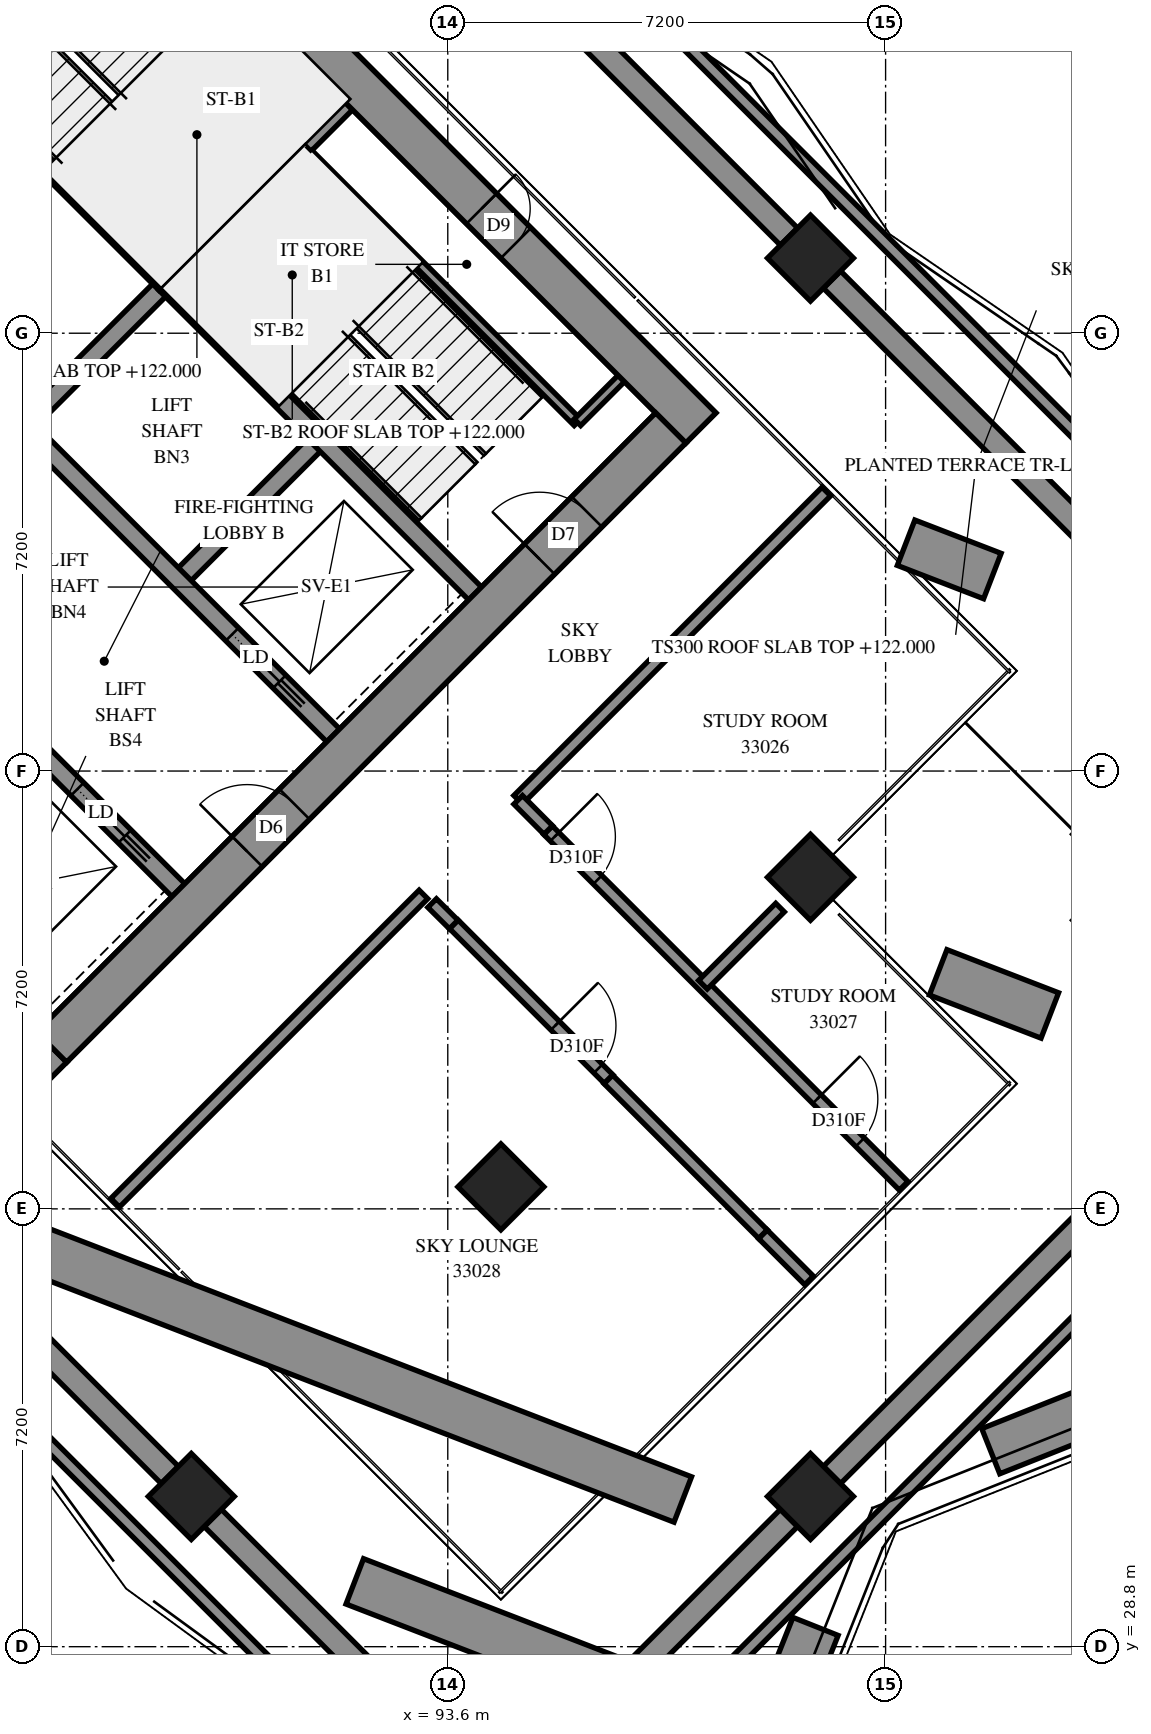
"""IFC4 building model, lengths in metres.
Left out: names, types, materials, properties, quantities, classifications, styles, units other than length and angle.
Written with IfcOpenShell. Run it as: python <this file> out.ifc"""

import sys

from ifc_helpers import new_model, si_unit, direction, frame, frame_2d, origin, origin_2d, place, context, subcontext, project, spatial, polyline, rectangle, outline, extrude, element, fill, save


model = new_model("IFC4")
c1 = context("Model", 3, precision=1e-05, world=origin(), true_north=direction((0.0, 1.0)))
c2 = subcontext(c1, "Body", "Model", "MODEL_VIEW")
j1 = project(units=[si_unit("LENGTHUNIT", "METRE"), si_unit("PLANEANGLEUNIT", "RADIAN")], contexts=[c1])
p1 = place(None, origin())
s1 = spatial("IfcSite", under=j1, at=p1, CompositionType="ELEMENT")
p2 = place(p1, origin())
s2 = spatial("IfcBuilding", under=s1, at=p2, CompositionType="ELEMENT")
p3 = place(p2, frame((0.0, 0.0, 122.0)))
s3 = spatial("IfcBuildingStorey", under=s2, at=p3, CompositionType="ELEMENT", Elevation=122.0)
for number, where, z_axis, x_axis in (
    (1, (99.565, 51.635, 0.0), (0.0, 0.0, 1.0), (0.707, -0.707, 0.0)),
    (2, (99.565, 41.453, 0.0), (0.0, 0.0, 1.0), (0.707, -0.707, 0.0)),
    (3, (94.474, 36.362, 0.0), (0.0, 0.0, 1.0), (0.707, -0.707, 0.0)),
    (4, (89.382, 31.271, 0.0), (0.0, 0.0, 1.0), (0.707, -0.707, 0.0)),
    (5, (99.565, 31.271, 0.0), (0.0, 0.0, 1.0), (0.707, -0.707, 0.0)),
):
    element("IfcColumn", number, at=place(p3, frame(where, z_axis=z_axis, x_axis=x_axis)), inside=s3, PredefinedType="COLUMN", context=c2, shape_type="SweptSolid", body=[
        extrude(rectangle(XDim=1.0, YDim=1.0, at=origin_2d()), origin(), (0.0, 0.0, 1.0), 3.9),
    ])
p4 = place(p3, frame((75.912, 49.337, -0.3), z_axis=(0.0, 0.0, 1.0), x_axis=(0.7071036166, -0.7071099457, 0.0)))
e6 = element("IfcWall", 6, at=p4, inside=s3, PredefinedType="SHEAR", context=c2, shape_type="SweptSolid", body=[
    extrude(rectangle(XDim=15.8, YDim=0.7, at=frame_2d((7.9, 0.0))), origin(), (0.0, 0.0, 1.0), 3.5),
])
p5 = place(p3, frame((86.589, 60.014, -0.3), z_axis=(0.0, 0.0, 1.0), x_axis=(0.7071099457, -0.7071036166, 0.0)))
e7 = element("IfcWall", 7, at=p5, inside=s3, PredefinedType="SHEAR", context=c2, shape_type="SweptSolid", body=[
    extrude(rectangle(XDim=15.8, YDim=0.7, at=frame_2d((7.9, 0.0))), origin(), (0.0, 0.0, 1.0), 3.5),
])
p6 = place(p5, frame((10.7, 0.0, 0.3)))
e8 = element("IfcOpeningElement", 8, at=p6, cuts=e7, PredefinedType="OPENING", context=c2, shape_type="SweptSolid", body=[
    extrude(rectangle(XDim=0.8, YDim=2.1, at=frame_2d((0.4, 1.05))), frame((0.0, 0.36, 0.0), z_axis=(0.0, -1.0, 0.0), x_axis=(1.0, 0.0, 0.0)), (0.0, 0.0, 1.0), 0.72),
])
p7 = place(p3, frame((87.084, 38.66, -0.3), z_axis=(0.0, 0.0, 1.0), x_axis=(0.7071067812, 0.7071067812, 0.0)))
e9 = element("IfcWall", 9, at=p7, inside=s3, PredefinedType="SHEAR", context=c2, shape_type="SweptSolid", body=[
    extrude(rectangle(XDim=14.4, YDim=0.7, at=frame_2d((7.2, 0.0))), origin(), (0.0, 0.0, 1.0), 3.5),
])
p8 = place(p7, frame((4.55, 0.0, 0.3)))
e10 = element("IfcOpeningElement", 10, at=p8, cuts=e9, PredefinedType="OPENING", context=c2, shape_type="SweptSolid", body=[
    extrude(rectangle(XDim=1.1, YDim=2.1, at=frame_2d((0.55, 1.05))), frame((0.0, 0.36, 0.0), z_axis=(0.0, -1.0, 0.0), x_axis=(1.0, 0.0, 0.0)), (0.0, 0.0, 1.0), 0.72),
])
p9 = place(p7, frame((11.35, 0.0, 0.3)))
e11 = element("IfcOpeningElement", 11, at=p9, cuts=e9, PredefinedType="OPENING", context=c2, shape_type="SweptSolid", body=[
    extrude(rectangle(XDim=1.1, YDim=2.1, at=frame_2d((0.55, 1.05))), frame((0.0, 0.36, 0.0), z_axis=(0.0, -1.0, 0.0), x_axis=(1.0, 0.0, 0.0)), (0.0, 0.0, 1.0), 0.72),
])
for number, where, z_axis, x_axis in (
    (12, (86.625, 48.878, 0.0), (0.0, 0.0, 1.0), (0.707, 0.707, 0.0)),
    (13, (89.17, 46.332, 0.0), (0.0, 0.0, 1.0), (0.707, 0.707, 0.0)),
):
    element("IfcWall", number, at=place(p3, frame(where, z_axis=z_axis, x_axis=x_axis)), inside=s3, PredefinedType="SOLIDWALL", context=c2, shape_type="SweptSolid", body=[
        extrude(rectangle(XDim=3.3, YDim=0.3, at=frame_2d((1.65, 0.0))), origin(), (0.0, 0.0, 1.0), 3.9),
    ])
p10 = place(p3, frame((78.988, 51.423, 0.0), z_axis=(0.0, 0.0, 1.0), x_axis=(0.7071067812, -0.7071067812, 0.0)))
e14 = element("IfcWall", 14, at=p10, inside=s3, PredefinedType="SOLIDWALL", context=c2, shape_type="SweptSolid", body=[
    extrude(rectangle(XDim=14.4, YDim=0.3, at=frame_2d((7.2, 0.0))), origin(), (0.0, 0.0, 1.0), 3.9),
])
p11 = place(p10, frame((1.25, 0.0, 0.0)))
e15 = element("IfcOpeningElement", 15, at=p11, cuts=e14, PredefinedType="OPENING", context=c2, shape_type="SweptSolid", body=[
    extrude(rectangle(XDim=1.1, YDim=2.1, at=frame_2d((0.55, 1.05))), frame((0.0, 0.16, 0.0), z_axis=(0.0, -1.0, 0.0), x_axis=(1.0, 0.0, 0.0)), (0.0, 0.0, 1.0), 0.32),
])
p12 = place(p10, frame((4.85, 0.0, 0.0)))
e16 = element("IfcOpeningElement", 16, at=p12, cuts=e14, PredefinedType="OPENING", context=c2, shape_type="SweptSolid", body=[
    extrude(rectangle(XDim=1.1, YDim=2.1, at=frame_2d((0.55, 1.05))), frame((0.0, 0.16, 0.0), z_axis=(0.0, -1.0, 0.0), x_axis=(1.0, 0.0, 0.0)), (0.0, 0.0, 1.0), 0.32),
])
p13 = place(p10, frame((8.45, 0.0, 0.0)))
e17 = element("IfcOpeningElement", 17, at=p13, cuts=e14, PredefinedType="OPENING", context=c2, shape_type="SweptSolid", body=[
    extrude(rectangle(XDim=1.1, YDim=2.1, at=frame_2d((0.55, 1.05))), frame((0.0, 0.16, 0.0), z_axis=(0.0, -1.0, 0.0), x_axis=(1.0, 0.0, 0.0)), (0.0, 0.0, 1.0), 0.32),
])
p14 = place(p10, frame((12.05, 0.0, 0.0)))
e18 = element("IfcOpeningElement", 18, at=p14, cuts=e14, PredefinedType="OPENING", context=c2, shape_type="SweptSolid", body=[
    extrude(rectangle(XDim=1.1, YDim=2.1, at=frame_2d((0.55, 1.05))), frame((0.0, 0.16, 0.0), z_axis=(0.0, -1.0, 0.0), x_axis=(1.0, 0.0, 0.0)), (0.0, 0.0, 1.0), 0.32),
])
p15 = place(p3, frame((81.534, 53.969, 0.0), z_axis=(0.0, 0.0, 1.0), x_axis=(0.707103309, -0.7071102534, 0.0)))
e19 = element("IfcWall", 19, at=p15, inside=s3, PredefinedType="SOLIDWALL", context=c2, shape_type="SweptSolid", body=[
    extrude(rectangle(XDim=14.4, YDim=0.3, at=frame_2d((7.2, 0.0))), origin(), (0.0, 0.0, 1.0), 3.9),
])
p16 = place(p15, frame((12.05, 0.0, 0.0)))
e20 = element("IfcOpeningElement", 20, at=p16, cuts=e19, PredefinedType="OPENING", context=c2, shape_type="SweptSolid", body=[
    extrude(rectangle(XDim=1.1, YDim=2.1, at=frame_2d((0.55, 1.05))), frame((0.0, 0.16, 0.0), z_axis=(0.0, -1.0, 0.0), x_axis=(1.0, 0.0, 0.0)), (0.0, 0.0, 1.0), 0.32),
])
for number, where, z_axis, x_axis in (
    (21, (83.867, 56.302, 0.0), (0.0, 0.0, 1.0), (0.707, -0.707, 0.0)),
    (22, (88.958, 51.211, 0.0), (0.0, 0.0, 1.0), (0.707, -0.707, 0.0)),
):
    element("IfcWall", number, at=place(p3, frame(where, z_axis=z_axis, x_axis=x_axis)), inside=s3, PredefinedType="SOLIDWALL", context=c2, shape_type="SweptSolid", body=[
        extrude(rectangle(XDim=7.2, YDim=0.3, at=frame_2d((3.6, 0.0))), origin(), (0.0, 0.0, 1.0), 3.9),
    ])
p17 = place(p3, frame((88.958, 51.211, 0.0), z_axis=(0.0, 0.0, 1.0), x_axis=(0.7071067812, 0.7071067812, 0.0)))
e23 = element("IfcWall", 23, at=p17, inside=s3, PredefinedType="SOLIDWALL", context=c2, shape_type="SweptSolid", body=[
    extrude(rectangle(XDim=4.2, YDim=0.3, at=frame_2d((2.1, 0.0))), origin(), (0.0, 0.0, 1.0), 3.9),
])
for number, where, z_axis, x_axis in (
    (24, (98.638, 26.597, 0.0), (0.0, 0.0, 1.0), (0.37, 0.929, 0.0)),
    (25, (102.529, 32.015, 0.0), (0.0, 0.0, 1.0), (0.929, 0.37, 0.0)),
):
    element("IfcWall", number, at=place(p3, frame(where, z_axis=z_axis, x_axis=x_axis)), inside=s3, PredefinedType="SOLIDWALL", context=c2, shape_type="SweptSolid", body=[
        extrude(rectangle(XDim=2.73, YDim=0.8, at=frame_2d((1.365, 0.0))), origin(), (0.0, 0.0, 1.0), 0.65),
    ])
p18 = place(p3, frame((102.556, 46.407, 0.0), z_axis=(0.0, 0.0, 1.0), x_axis=(-0.9328142082, 0.3603576737, 0.0)))
e26 = element("IfcWall", 26, at=p18, inside=s3, PredefinedType="SOLIDWALL", context=c2, shape_type="SweptSolid", body=[
    extrude(rectangle(XDim=1.521, YDim=0.8, at=frame_2d((0.76, 0.0))), origin(), (0.0, 0.0, 1.0), 0.65),
])
p19 = place(p3, frame((97.465, 31.221, 0.0), z_axis=(0.0, 0.0, 1.0), x_axis=(-0.9328069089, 0.360376568, 0.0)))
e27 = element("IfcWall", 27, at=p19, inside=s3, PredefinedType="SOLIDWALL", context=c2, shape_type="SweptSolid", body=[
    extrude(rectangle(XDim=11.668, YDim=0.8, at=frame_2d((5.834, 0.0))), origin(), (0.0, 0.0, 1.0), 0.65),
])
p20 = place(p3, frame((96.202, 28.278, 0.0), z_axis=(0.0, 0.0, 1.0), x_axis=(-0.9328115883, 0.3603644555, 0.0)))
e28 = element("IfcWall", 28, at=p20, inside=s3, PredefinedType="SOLIDWALL", context=c2, shape_type="SweptSolid", body=[
    extrude(rectangle(XDim=4.429, YDim=0.8, at=frame_2d((2.215, 0.0))), origin(), (0.0, 0.0, 1.0), 0.65),
])
p21 = place(p3, frame((107.838, 44.847, 0.0), z_axis=(0.0, 0.0, 1.0), x_axis=(-0.7071067812, 0.7071067812, 0.0)))
e29 = element("IfcWall", 29, at=p21, inside=s3, PredefinedType="SOLIDWALL", context=c2, shape_type="SweptSolid", body=[
    extrude(outline(polyline([(-0.1, -0.1), (39.926, -0.1), (39.843, 0.1), (0.1, 0.1), (-0.1, -0.1)])), origin(), (0.0, 0.0, 1.0), 4.2),
])
p22 = place(p3, frame((77.018, 42.15, 0.0), z_axis=(0.0, 0.0, 1.0), x_axis=(0.7071067812, -0.7071067812, 0.0)))
e30 = element("IfcWall", 30, at=p22, inside=s3, PredefinedType="SOLIDWALL", context=c2, shape_type="SweptSolid", body=[
    extrude(outline(polyline([(0.041, -0.1), (24.786, -0.1), (24.586, 0.1), (-0.041, 0.1), (0.041, -0.1)])), origin(), (0.0, 0.0, 1.0), 4.2),
])
p23 = place(p3, frame((94.474, 24.695, 0.0), z_axis=(0.0, 0.0, 1.0), x_axis=(0.7071067812, 0.7071067812, 0.0)))
e31 = element("IfcWall", 31, at=p23, inside=s3, PredefinedType="SOLIDWALL", context=c2, shape_type="SweptSolid", body=[
    extrude(outline(polyline([(-0.1, -0.1), (19.0, -0.1), (18.8, 0.1), (0.1, 0.1), (-0.1, -0.1)])), origin(), (0.0, 0.0, 1.0), 4.2),
])
p24 = place(p3, frame((91.313, 53.354, 0.0), z_axis=(0.0, 0.0, 1.0), x_axis=(0.7071147811, -0.7070987812, 0.0)))
e32 = element("IfcWall", 32, at=p24, inside=s3, PredefinedType="PARTITIONING", context=c2, shape_type="SweptSolid", body=[
    extrude(rectangle(XDim=6.25, YDim=0.15, at=frame_2d((3.125, 0.0))), origin(), (0.0, 0.0, 1.0), 3.9),
])
p25 = place(p3, frame((95.732, 48.934, 0.0), z_axis=(0.0, 0.0, 1.0), x_axis=(0.7071067812, 0.7071067812, 0.0)))
e33 = element("IfcWall", 33, at=p25, inside=s3, PredefinedType="PARTITIONING", context=c2, shape_type="SweptSolid", body=[
    extrude(rectangle(XDim=1.02, YDim=0.15, at=frame_2d((0.51, 0.0))), origin(), (0.0, 0.0, 1.0), 3.9),
])
p26 = place(p3, frame((95.249, 42.227, 0.0), z_axis=(0.0, 0.0, 1.0), x_axis=(0.7071067812, -0.7071067812, 0.0)))
e34 = element("IfcWall", 34, at=p26, inside=s3, PredefinedType="PARTITIONING", context=c2, shape_type="SweptSolid", body=[
    extrude(rectangle(XDim=8.27, YDim=0.2, at=frame_2d((4.135, 0.0))), origin(), (0.0, 0.0, 1.0), 3.9),
])
p27 = place(p26, frame((0.152, 0.0, 0.0)))
e35 = element("IfcOpeningElement", 35, at=p27, cuts=e34, PredefinedType="OPENING", context=c2, shape_type="SweptSolid", body=[
    extrude(rectangle(XDim=1.0, YDim=2.1, at=frame_2d((0.5, 1.05))), frame((0.0, 0.11, 0.0), z_axis=(0.0, -1.0, 0.0), x_axis=(1.0, 0.0, 0.0)), (0.0, 0.0, 1.0), 0.22),
])
p28 = place(p26, frame((6.255, 0.0, 0.0)))
e36 = element("IfcOpeningElement", 36, at=p28, cuts=e34, PredefinedType="OPENING", context=c2, shape_type="SweptSolid", body=[
    extrude(rectangle(XDim=1.0, YDim=2.1, at=frame_2d((0.5, 1.05))), frame((0.0, 0.11, 0.0), z_axis=(0.0, -1.0, 0.0), x_axis=(1.0, 0.0, 0.0)), (0.0, 0.0, 1.0), 0.22),
])
p29 = place(p3, frame((88.129, 36.1, 0.0), z_axis=(0.0, 0.0, 1.0), x_axis=(0.7071067812, 0.7071067812, 0.0)))
e37 = element("IfcWall", 37, at=p29, inside=s3, PredefinedType="PARTITIONING", context=c2, shape_type="SweptSolid", body=[
    extrude(rectangle(XDim=7.17, YDim=0.2, at=frame_2d((3.585, 0.0))), origin(), (0.0, 0.0, 1.0), 3.9),
])
p30 = place(p3, frame((94.757, 42.727, 0.0), z_axis=(0.0, 0.0, 1.0), x_axis=(0.7069672711, 0.7072462637, 0.0)))
e38 = element("IfcWall", 38, at=p30, inside=s3, PredefinedType="PARTITIONING", context=c2, shape_type="SweptSolid", body=[
    extrude(rectangle(XDim=7.169, YDim=0.2, at=frame_2d((3.584, 0.0))), origin(), (0.0, 0.0, 1.0), 3.9),
])
p31 = place(p3, frame((93.699, 40.679, 0.0), z_axis=(0.0, 0.0, 1.0), x_axis=(0.7071067812, -0.7071067812, 0.0)))
e39 = element("IfcWall", 39, at=p31, inside=s3, PredefinedType="PARTITIONING", context=c2, shape_type="SweptSolid", body=[
    extrude(rectangle(XDim=3.601, YDim=0.2, at=frame_2d((1.8, 0.0))), origin(), (0.0, 0.0, 1.0), 3.9),
])
p32 = place(p31, frame((2.357, 0.0, 0.0)))
e40 = element("IfcOpeningElement", 40, at=p32, cuts=e39, PredefinedType="OPENING", context=c2, shape_type="SweptSolid", body=[
    extrude(rectangle(XDim=1.0, YDim=2.1, at=frame_2d((0.5, 1.05))), frame((0.0, 0.11, 0.0), z_axis=(0.0, -1.0, 0.0), x_axis=(1.0, 0.0, 0.0)), (0.0, 0.0, 1.0), 0.22),
])
p33 = place(p3, frame((96.241, 38.129, 0.0), z_axis=(0.0, 0.0, 1.0), x_axis=(0.7068288851, -0.7073845681, 0.0)))
e41 = element("IfcWall", 41, at=p33, inside=s3, PredefinedType="PARTITIONING", context=c2, shape_type="SweptSolid", body=[
    extrude(rectangle(XDim=3.599, YDim=0.2, at=frame_2d((1.8, 0.0))), origin(), (0.0, 0.0, 1.0), 3.9),
])
p34 = place(p3, frame((97.796, 39.686, 0.0), z_axis=(0.0, 0.0, 1.0), x_axis=(0.7071067812, 0.7071067812, 0.0)))
e42 = element("IfcWall", 42, at=p34, inside=s3, PredefinedType="PARTITIONING", context=c2, shape_type="SweptSolid", body=[
    extrude(rectangle(XDim=1.793, YDim=0.2, at=frame_2d((0.897, 0.0))), origin(), (0.0, 0.0, 1.0), 3.9),
])
p35 = place(p3, frame((98.783, 35.581, 0.0), z_axis=(0.0, 0.0, 1.0), x_axis=(0.7071067812, -0.7071067812, 0.0)))
e43 = element("IfcWall", 43, at=p35, inside=s3, PredefinedType="PARTITIONING", context=c2, shape_type="SweptSolid", body=[
    extrude(rectangle(XDim=1.072, YDim=0.2, at=frame_2d((0.536, 0.0))), origin(), (0.0, 0.0, 1.0), 3.9),
])
p36 = place(p3, frame((94.758, 42.726, 0.0), z_axis=(0.0, 0.0, 1.0), x_axis=(0.7056768426, -0.7085338339, 0.0)))
e44 = element("IfcWall", 44, at=p36, inside=s3, PredefinedType="PARTITIONING", context=c2, shape_type="SweptSolid", body=[
    extrude(rectangle(XDim=0.7, YDim=0.2, at=frame_2d((0.35, 0.0))), origin(), (0.0, 0.0, 1.0), 3.9),
])
p37 = place(p3, frame((93.343, 41.029, 0.0), z_axis=(0.0, 0.0, 1.0), x_axis=(0.7091070712, -0.7051008166, 0.0)))
e45 = element("IfcWall", 45, at=p37, inside=s3, PredefinedType="PARTITIONING", context=c2, shape_type="SweptSolid", body=[
    extrude(rectangle(XDim=0.499, YDim=0.2, at=frame_2d((0.25, 0.0))), origin(), (0.0, 0.0, 1.0), 3.9),
])
p38 = place(p3, frame((103.501, 39.18, 0.0), z_axis=(0.0, 0.0, 1.0), x_axis=(-0.9328051208, 0.3603811963, 0.0)))
e46 = element("IfcWall", 46, at=p38, inside=s3, PredefinedType="SOLIDWALL", context=c2, shape_type="SweptSolid", body=[
    extrude(outline(polyline([(0.0, -0.4), (1.968, -0.4), (1.968, 0.4), (0.0, 0.4), (0.0, -0.4)])), origin(), (0.0, 0.0, 1.0), 0.65),
])
p39 = place(p6, origin())
e47 = element("IfcDoor", 47, at=p39, inside=s3, OperationType="SINGLE_SWING_RIGHT", PredefinedType="DOOR", context=c2, shape_type="SweptSolid", body=[
    extrude(rectangle(XDim=0.8, YDim=2.1, at=frame_2d((0.4, 1.05))), frame((0.0, -0.29, 0.0), z_axis=(0.0, -1.0, 0.0), x_axis=(1.0, 0.0, 0.0)), (0.0, 0.0, 1.0), 0.05),
])
fill(e8, e47)
p40 = place(p8, origin())
e48 = element("IfcDoor", 48, at=p40, inside=s3, OperationType="DOUBLE_DOOR_SINGLE_SWING", PredefinedType="DOOR", context=c2, shape_type="SweptSolid", body=[
    extrude(rectangle(XDim=1.1, YDim=2.1, at=frame_2d((0.55, 1.05))), frame((0.0, 0.025, 0.0), z_axis=(0.0, -1.0, 0.0), x_axis=(1.0, 0.0, 0.0)), (0.0, 0.0, 1.0), 0.05),
])
fill(e10, e48)
p41 = place(p9, origin())
e49 = element("IfcDoor", 49, at=p41, inside=s3, OperationType="SINGLE_SWING_RIGHT", PredefinedType="DOOR", context=c2, shape_type="SweptSolid", body=[
    extrude(rectangle(XDim=1.1, YDim=2.1, at=frame_2d((0.55, 1.05))), frame((0.0, 0.025, 0.0), z_axis=(0.0, -1.0, 0.0), x_axis=(1.0, 0.0, 0.0)), (0.0, 0.0, 1.0), 0.05),
])
fill(e11, e49)
p42 = place(p14, origin())
e50 = element("IfcDoor", 50, at=p42, inside=s3, OperationType="SLIDING_TO_RIGHT", PredefinedType="DOOR", context=c2, shape_type="SweptSolid", body=[
    extrude(rectangle(XDim=1.1, YDim=2.1, at=frame_2d((0.55, 1.05))), frame((0.0, 0.025, 0.0), z_axis=(0.0, -1.0, 0.0), x_axis=(1.0, 0.0, 0.0)), (0.0, 0.0, 1.0), 0.05),
])
fill(e18, e50)
p43 = place(p16, origin())
e51 = element("IfcDoor", 51, at=p43, inside=s3, OperationType="SLIDING_TO_RIGHT", PredefinedType="DOOR", context=c2, shape_type="SweptSolid", body=[
    extrude(rectangle(XDim=1.1, YDim=2.1, at=frame_2d((0.55, 1.05))), frame((0.0, 0.025, 0.0), z_axis=(0.0, -1.0, 0.0), x_axis=(1.0, 0.0, 0.0)), (0.0, 0.0, 1.0), 0.05),
])
fill(e20, e51)
p44 = place(p27, origin())
e52 = element("IfcDoor", 52, at=p44, inside=s3, OperationType="SINGLE_SWING_RIGHT", PredefinedType="DOOR", context=c2, shape_type="SweptSolid", body=[
    extrude(rectangle(XDim=1.0, YDim=2.1, at=frame_2d((0.5, 1.05))), frame((0.0, 0.025, 0.0), z_axis=(0.0, -1.0, 0.0), x_axis=(1.0, 0.0, 0.0)), (0.0, 0.0, 1.0), 0.05),
])
fill(e35, e52)
p45 = place(p28, origin())
e53 = element("IfcDoor", 53, at=p45, inside=s3, OperationType="SINGLE_SWING_LEFT", PredefinedType="DOOR", context=c2, shape_type="SweptSolid", body=[
    extrude(rectangle(XDim=1.0, YDim=2.1, at=frame_2d((0.5, 1.05))), frame((0.0, 0.025, 0.0), z_axis=(0.0, -1.0, 0.0), x_axis=(1.0, 0.0, 0.0)), (0.0, 0.0, 1.0), 0.05),
])
fill(e36, e53)
p46 = place(p32, origin())
e54 = element("IfcDoor", 54, at=p46, inside=s3, OperationType="SINGLE_SWING_LEFT", PredefinedType="DOOR", context=c2, shape_type="SweptSolid", body=[
    extrude(rectangle(XDim=1.0, YDim=2.1, at=frame_2d((0.5, 1.05))), frame((0.0, 0.025, 0.0), z_axis=(0.0, -1.0, 0.0), x_axis=(1.0, 0.0, 0.0)), (0.0, 0.0, 1.0), 0.05),
])
fill(e40, e54)
save(model, sys.argv[1])
